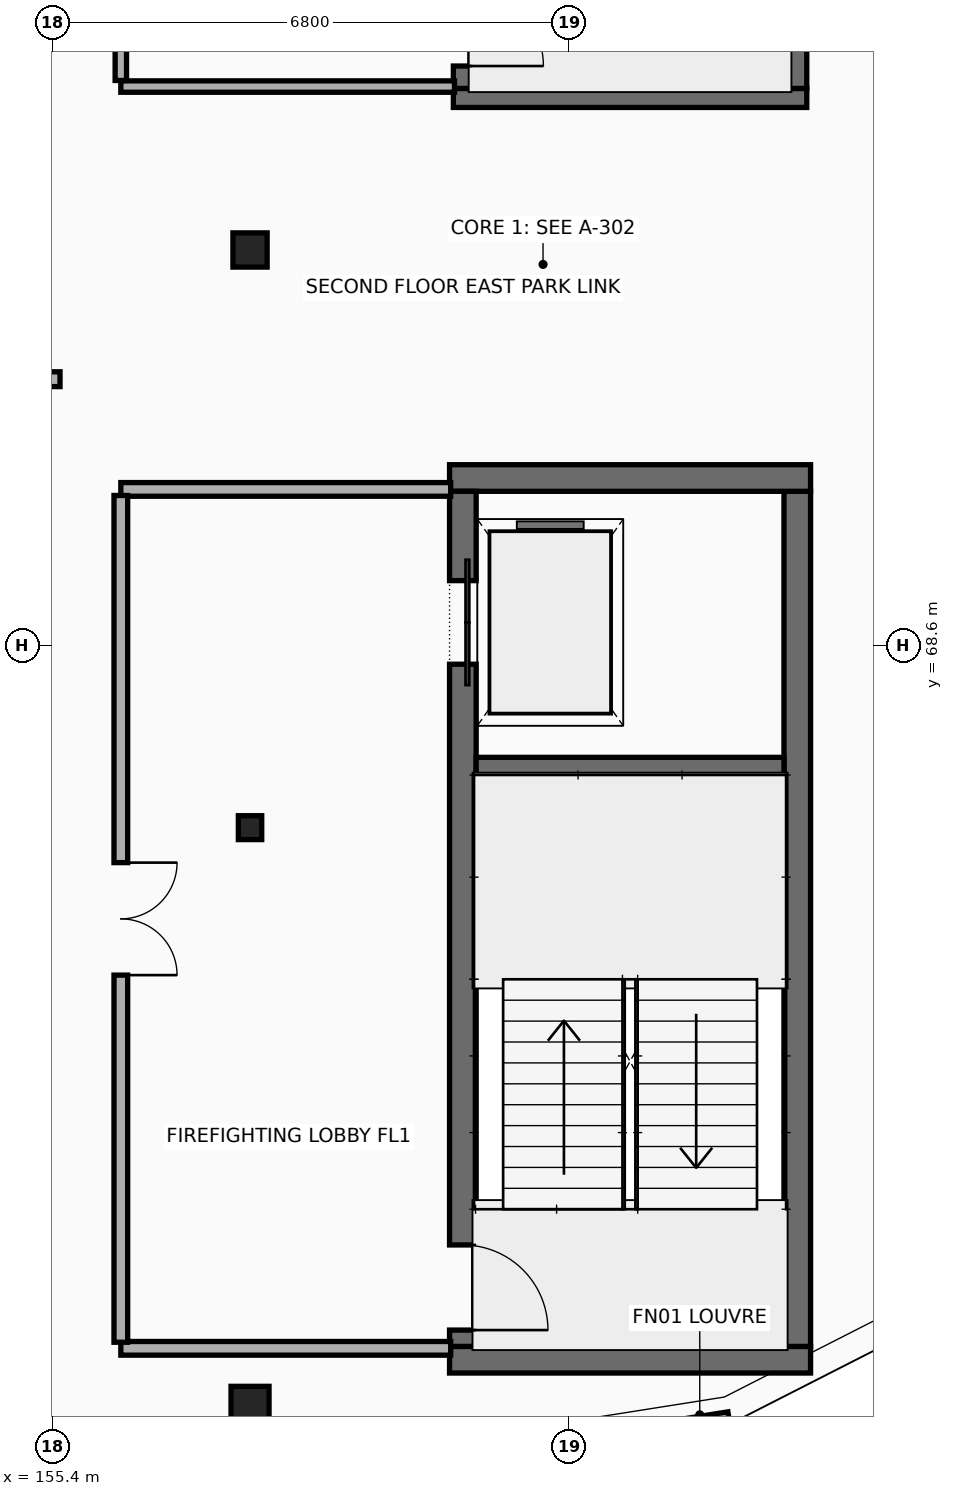
"""IFC4 building model, lengths in metres.
Left out: names, types, materials, properties, quantities, classifications, styles, units other than length and angle.
Written with IfcOpenShell. Run it as: python <this file> out.ifc"""

import sys

from ifc_helpers import new_model, si_unit, direction, frame, frame_2d, origin, origin_2d, place, context, subcontext, project, spatial, rectangle, i_section, extrude, element, fill, save


model = new_model("IFC4")
c1 = context("Model", 3, precision=1e-05, world=origin(), true_north=direction((0.0, 1.0)))
c2 = subcontext(c1, "Body", "Model", "MODEL_VIEW")
j1 = project(units=[si_unit("LENGTHUNIT", "METRE"), si_unit("PLANEANGLEUNIT", "RADIAN")], contexts=[c1])
p1 = place(None, origin())
s1 = spatial("IfcSite", under=j1, at=p1, CompositionType="ELEMENT")
p2 = place(p1, origin())
s2 = spatial("IfcBuilding", under=s1, at=p2, CompositionType="ELEMENT")
p3 = place(p2, frame((0.0, 0.0, 8.7)))
s3 = spatial("IfcBuildingStorey", under=s2, at=p3, CompositionType="ELEMENT", Elevation=8.7)
p4 = place(p3, frame((160.625, 59.2, 0.0), z_axis=(0.0, 0.0, 1.0), x_axis=(1.0, 0.0, 0.0)))
e1 = element("IfcWall", 1, at=p4, inside=s3, PredefinedType="SHEAR", context=c2, shape_type="SweptSolid", body=[
    extrude(rectangle(XDim=4.75, YDim=0.35, at=frame_2d((2.375, 0.0))), origin(), (0.0, 0.0, 1.0), 3.9),
])
p5 = place(p3, frame((165.2, 59.375, 0.0), z_axis=(0.0, 0.0, 1.0), x_axis=(0.0, 1.0, 0.0)))
e2 = element("IfcWall", 2, at=p5, inside=s3, PredefinedType="SHEAR", context=c2, shape_type="SweptSolid", body=[
    extrude(rectangle(XDim=11.25, YDim=0.35, at=frame_2d((5.625, 0.0))), origin(), (0.0, 0.0, 1.0), 3.9),
])
p6 = place(p3, frame((165.375, 70.8, 0.0), z_axis=(0.0, 0.0, 1.0), x_axis=(-1.0, 0.0, 0.0)))
e3 = element("IfcWall", 3, at=p6, inside=s3, PredefinedType="SHEAR", context=c2, shape_type="SweptSolid", body=[
    extrude(rectangle(XDim=4.75, YDim=0.35, at=frame_2d((2.375, 0.0))), origin(), (0.0, 0.0, 1.0), 3.9),
])
p7 = place(p3, frame((160.8, 70.625, 0.0), z_axis=(0.0, 0.0, 1.0), x_axis=(0.0, -1.0, 0.0)))
e4 = element("IfcWall", 4, at=p7, inside=s3, PredefinedType="SHEAR", context=c2, shape_type="SweptSolid", body=[
    extrude(rectangle(XDim=11.25, YDim=0.35, at=frame_2d((5.625, 0.0))), origin(), (0.0, 0.0, 1.0), 3.9),
])
p8 = place(p7, frame((1.175, 0.0, 0.0)))
e5 = element("IfcOpeningElement", 5, at=p8, cuts=e4, PredefinedType="OPENING", context=c2, shape_type="SweptSolid", body=[
    extrude(rectangle(XDim=1.1, YDim=2.2, at=frame_2d((0.55, 1.1))), frame((0.0, 0.185, 0.0), z_axis=(0.0, -1.0, 0.0), x_axis=(1.0, 0.0, 0.0)), (0.0, 0.0, 1.0), 0.37),
])
p9 = place(p7, frame((9.915, 0.0, 0.0)))
e6 = element("IfcOpeningElement", 6, at=p9, cuts=e4, PredefinedType="OPENING", context=c2, shape_type="SweptSolid", body=[
    extrude(rectangle(XDim=1.12, YDim=2.16, at=frame_2d((0.56, 1.08))), frame((0.0, 0.185, 0.0), z_axis=(0.0, -1.0, 0.0), x_axis=(1.0, 0.0, 0.0)), (0.0, 0.0, 1.0), 0.37),
])
p10 = place(p3, frame((160.975, 67.0, 0.0), z_axis=(0.0, 0.0, 1.0), x_axis=(1.0, 0.0, 0.0)))
e7 = element("IfcWall", 7, at=p10, inside=s3, PredefinedType="SHEAR", context=c2, shape_type="SweptSolid", body=[
    extrude(rectangle(XDim=4.05, YDim=0.25, at=frame_2d((2.025, 0.0))), origin(), (0.0, 0.0, 1.0), 3.9),
])
p11 = place(p3, frame((160.675, 75.8, 0.0), z_axis=(0.0, 0.0, 1.0), x_axis=(1.0, 0.0, 0.0)))
e8 = element("IfcWall", 8, at=p11, inside=s3, PredefinedType="SHEAR", context=c2, shape_type="SweptSolid", body=[
    extrude(rectangle(XDim=4.65, YDim=0.25, at=frame_2d((2.325, 0.0))), origin(), (0.0, 0.0, 1.0), 3.9),
])
p12 = place(p3, frame((165.2, 75.925, 0.0), z_axis=(0.0, 0.0, 1.0), x_axis=(0.0, 1.0, 0.0)))
e9 = element("IfcWall", 9, at=p12, inside=s3, PredefinedType="SHEAR", context=c2, shape_type="SweptSolid", body=[
    extrude(rectangle(XDim=11.35, YDim=0.25, at=frame_2d((5.675, 0.0))), origin(), (0.0, 0.0, 1.0), 3.9),
])
p13 = place(p3, frame((160.8, 87.275, 0.0), z_axis=(0.0, 0.0, 1.0), x_axis=(0.0, -1.0, 0.0)))
e10 = element("IfcWall", 10, at=p13, inside=s3, PredefinedType="SHEAR", context=c2, shape_type="SweptSolid", body=[
    extrude(rectangle(XDim=11.35, YDim=0.25, at=frame_2d((5.675, 0.0))), origin(), (0.0, 0.0, 1.0), 3.9),
])
p14 = place(p13, frame((1.275, 0.0, 0.0)))
e11 = element("IfcOpeningElement", 11, at=p14, cuts=e10, PredefinedType="OPENING", context=c2, shape_type="SweptSolid", body=[
    extrude(rectangle(XDim=1.0, YDim=2.15, at=frame_2d((0.5, 1.075))), frame((0.0, 0.135, 0.0), z_axis=(0.0, -1.0, 0.0), x_axis=(1.0, 0.0, 0.0)), (0.0, 0.0, 1.0), 0.27),
])
p15 = place(p13, frame((9.995, 0.0, 0.0)))
e12 = element("IfcOpeningElement", 12, at=p15, cuts=e10, PredefinedType="OPENING", context=c2, shape_type="SweptSolid", body=[
    extrude(rectangle(XDim=1.06, YDim=2.15, at=frame_2d((0.53, 1.075))), frame((0.0, 0.135, 0.0), z_axis=(0.0, -1.0, 0.0), x_axis=(1.0, 0.0, 0.0)), (0.0, 0.0, 1.0), 0.27),
])
p16 = place(p3, frame((158.0, 58.6, 0.0), z_axis=(0.0, 0.0, 1.0), x_axis=(1.0, 0.0, 0.0)))
e13 = element("IfcColumn", 13, at=p16, inside=s3, PredefinedType="COLUMN", context=c2, shape_type="SweptSolid", body=[
    extrude(rectangle(XDim=0.5, YDim=0.5, at=origin_2d()), origin(), (0.0, 0.0, 1.0), 3.9),
])
p17 = place(p3, frame((158.0, 66.2, 0.0), z_axis=(0.0, 0.0, 1.0), x_axis=(1.0, 0.0, 0.0)))
e14 = element("IfcColumn", 14, at=p17, inside=s3, PredefinedType="COLUMN", context=c2, shape_type="SweptSolid", body=[
    extrude(i_section(OverallWidth=0.307, OverallDepth=0.314, WebThickness=0.012, FlangeThickness=0.019, at=origin_2d()), origin(), (0.0, 0.0, 1.0), 3.9),
])
p18 = place(p3, frame((158.0, 73.8, 0.0), z_axis=(0.0, 0.0, 1.0), x_axis=(1.0, 0.0, 0.0)))
e15 = element("IfcColumn", 15, at=p18, inside=s3, PredefinedType="COLUMN", context=c2, shape_type="SweptSolid", body=[
    extrude(rectangle(XDim=0.45, YDim=0.45, at=origin_2d()), origin(), (0.0, 0.0, 1.0), 3.9),
])
p19 = place(p3, frame((164.311, 58.366, 0.0), z_axis=(0.0, 0.0, 1.0), x_axis=(-0.987686277286, -0.156447491706, 0.0)))
e16 = element("IfcWall", 16, at=p19, inside=s3, PredefinedType="STANDARD", context=c2, shape_type="SweptSolid", body=[
    extrude(rectangle(XDim=2.327, YDim=0.3, at=frame_2d((1.163, 0.0))), origin(), (0.0, 0.0, 1.0), 3.642),
])
p20 = place(p19, frame((0.714, 0.0, 0.9)))
e17 = element("IfcOpeningElement", 17, at=p20, cuts=e16, PredefinedType="OPENING", context=c2, shape_type="SweptSolid", body=[
    extrude(rectangle(XDim=0.9, YDim=1.2, at=frame_2d((0.45, 0.6))), frame((0.0, 0.16, 0.0), z_axis=(0.0, -1.0, 0.0), x_axis=(1.0, 0.0, 0.0)), (0.0, 0.0, 1.0), 0.32),
])
p21 = place(p3, frame((156.3, 59.35, 0.0), z_axis=(0.0, 0.0, 1.0), x_axis=(1.0, 0.0, 0.0)))
e18 = element("IfcWall", 18, at=p21, inside=s3, PredefinedType="PARTITIONING", context=c2, shape_type="SweptSolid", body=[
    extrude(rectangle(XDim=4.34, YDim=0.18, at=frame_2d((2.17, 0.0))), origin(), (0.0, 0.0, 1.0), 2.947),
])
p22 = place(p3, frame((160.64, 70.65, 0.0), z_axis=(0.0, 0.0, 1.0), x_axis=(-1.0, 0.0, 0.0)))
e19 = element("IfcWall", 19, at=p22, inside=s3, PredefinedType="PARTITIONING", context=c2, shape_type="SweptSolid", body=[
    extrude(rectangle(XDim=4.34, YDim=0.18, at=frame_2d((2.17, 0.0))), origin(), (0.0, 0.0, 1.0), 2.943),
])
p23 = place(p3, frame((156.3, 70.57, 0.0), z_axis=(0.0, 0.0, 1.0), x_axis=(0.0, -1.0, 0.0)))
e20 = element("IfcWall", 20, at=p23, inside=s3, PredefinedType="PARTITIONING", context=c2, shape_type="SweptSolid", body=[
    extrude(rectangle(XDim=11.14, YDim=0.18, at=frame_2d((5.57, 0.0))), origin(), (0.0, 0.0, 1.0), 2.947),
])
p24 = place(p23, frame((4.83, 0.0, 0.0)))
e21 = element("IfcOpeningElement", 21, at=p24, cuts=e20, PredefinedType="OPENING", context=c2, shape_type="SweptSolid", body=[
    extrude(rectangle(XDim=1.48, YDim=2.22, at=frame_2d((0.74, 1.11))), frame((0.0, 0.1, 0.0), z_axis=(0.0, -1.0, 0.0), x_axis=(1.0, 0.0, 0.0)), (0.0, 0.0, 1.0), 0.2),
])
p25 = place(p3, frame((156.3, 75.95, 0.0), z_axis=(0.0, 0.0, 1.0), x_axis=(1.0, 0.0, 0.0)))
e22 = element("IfcWall", 22, at=p25, inside=s3, PredefinedType="PARTITIONING", context=c2, shape_type="SweptSolid", body=[
    extrude(rectangle(XDim=4.39, YDim=0.15, at=frame_2d((2.195, 0.0))), origin(), (0.0, 0.0, 1.0), 2.868),
])
p26 = place(p3, frame((156.3, 87.17, 0.0), z_axis=(0.0, 0.0, 1.0), x_axis=(0.0, -1.0, 0.0)))
e23 = element("IfcWall", 23, at=p26, inside=s3, PredefinedType="PARTITIONING", context=c2, shape_type="SweptSolid", body=[
    extrude(rectangle(XDim=11.14, YDim=0.15, at=frame_2d((5.57, 0.0))), origin(), (0.0, 0.0, 1.0), 3.17),
])
p27 = place(p26, frame((4.88, 0.0, 0.0)))
e24 = element("IfcOpeningElement", 24, at=p27, cuts=e23, PredefinedType="OPENING", context=c2, shape_type="SweptSolid", body=[
    extrude(rectangle(XDim=1.38, YDim=2.2, at=frame_2d((0.69, 1.1))), frame((0.0, 0.085, 0.0), z_axis=(0.0, -1.0, 0.0), x_axis=(1.0, 0.0, 0.0)), (0.0, 0.0, 1.0), 0.17),
])
p28 = place(p3, frame((137.73, 72.1, 0.0), z_axis=(0.0, 0.0, 1.0), x_axis=(1.0, 0.0, 0.0)))
e25 = element("IfcWall", 25, at=p28, inside=s3, PredefinedType="PARTITIONING", context=c2, shape_type="SweptSolid", body=[
    extrude(rectangle(XDim=17.77, YDim=0.195, at=frame_2d((8.885, 0.0))), origin(), (0.0, 0.0, 1.0), 2.947),
])
p29 = place(p8, origin())
e26 = element("IfcDoor", 26, at=p29, inside=s3, OperationType="DOUBLE_DOOR_SLIDING", PredefinedType="DOOR", context=c2, shape_type="SweptSolid", body=[
    extrude(rectangle(XDim=1.1, YDim=2.2, at=frame_2d((0.55, 1.1))), frame((0.0, 0.025, 0.0), z_axis=(0.0, -1.0, 0.0), x_axis=(1.0, 0.0, 0.0)), (0.0, 0.0, 1.0), 0.05),
])
fill(e5, e26)
p30 = place(p9, origin())
e27 = element("IfcDoor", 27, at=p30, inside=s3, OperationType="SINGLE_SWING_RIGHT", PredefinedType="DOOR", context=c2, shape_type="SweptSolid", body=[
    extrude(rectangle(XDim=1.12, YDim=2.16, at=frame_2d((0.56, 1.08))), frame((0.0, 0.025, 0.0), z_axis=(0.0, -1.0, 0.0), x_axis=(1.0, 0.0, 0.0)), (0.0, 0.0, 1.0), 0.05),
])
fill(e6, e27)
p31 = place(p15, origin())
e28 = element("IfcDoor", 28, at=p31, inside=s3, OperationType="SINGLE_SWING_RIGHT", PredefinedType="DOOR", context=c2, shape_type="SweptSolid", body=[
    extrude(rectangle(XDim=1.06, YDim=2.15, at=frame_2d((0.53, 1.075))), frame((0.0, 0.025, 0.0), z_axis=(0.0, -1.0, 0.0), x_axis=(1.0, 0.0, 0.0)), (0.0, 0.0, 1.0), 0.05),
])
fill(e12, e28)
p32 = place(p24, origin())
e29 = element("IfcDoor", 29, at=p32, inside=s3, OperationType="DOUBLE_DOOR_SINGLE_SWING", PredefinedType="DOOR", context=c2, shape_type="SweptSolid", body=[
    extrude(rectangle(XDim=1.48, YDim=2.22, at=frame_2d((0.74, 1.11))), frame((0.0, 0.025, 0.0), z_axis=(0.0, -1.0, 0.0), x_axis=(1.0, 0.0, 0.0)), (0.0, 0.0, 1.0), 0.05),
])
fill(e21, e29)
save(model, sys.argv[1])
